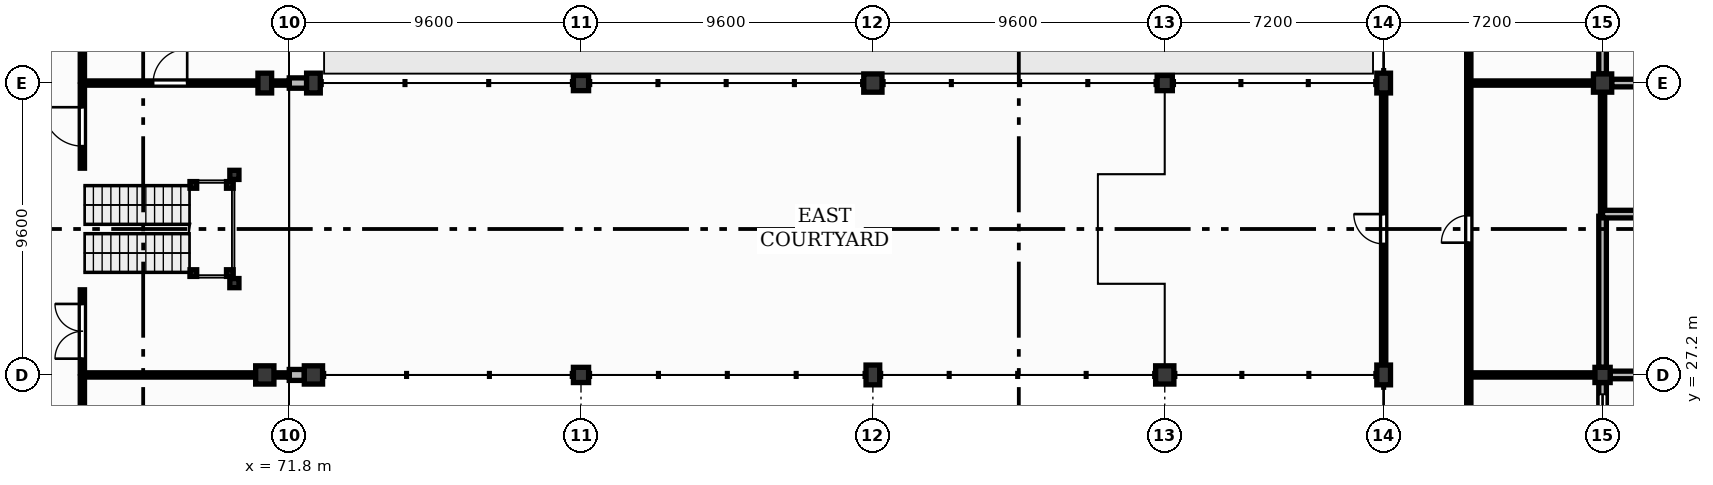
"""IFC4 building model, lengths in metres.
Left out: names, types, materials, properties, quantities, classifications, styles, units other than length and angle.
Written with IfcOpenShell. Run it as: python <this file> out.ifc"""

import sys

from ifc_helpers import new_model, si_unit, direction, frame, frame_2d, origin, origin_2d, place, context, subcontext, project, spatial, rectangle, hollow_circle, i_section, extrude, element, fill, save


model = new_model("IFC4")
c1 = context("Model", 3, precision=1e-05, world=origin(), true_north=direction((0.0, 1.0)))
c2 = subcontext(c1, "Body", "Model", "MODEL_VIEW")
j1 = project(units=[si_unit("LENGTHUNIT", "METRE"), si_unit("PLANEANGLEUNIT", "RADIAN")], contexts=[c1])
p1 = place(None, origin())
s1 = spatial("IfcSite", under=j1, at=p1, CompositionType="ELEMENT")
p2 = place(p1, origin())
s2 = spatial("IfcBuilding", under=s1, at=p2, CompositionType="ELEMENT")
p3 = place(p2, origin())
s3 = spatial("IfcBuildingStorey", under=s2, at=p3, CompositionType="ELEMENT", Elevation=0.0)
p4 = place(p3, frame((72.6, 27.2, 0.0), z_axis=(0.0, 0.0, 1.0), x_axis=(1.0, 0.0, 0.0)))
e1 = element("IfcColumn", 1, at=p4, inside=s3, PredefinedType="COLUMN", context=c2, shape_type="SweptSolid", body=[
    extrude(rectangle(XDim=0.6, YDim=0.6, at=origin_2d()), origin(), (0.0, 0.0, 1.0), 4.2),
])
p5 = place(p3, frame((72.6, 36.8, 0.0), z_axis=(0.0, 0.0, 1.0), x_axis=(1.0, 0.0, 0.0)))
e2 = element("IfcColumn", 2, at=p5, inside=s3, PredefinedType="COLUMN", context=c2, shape_type="SweptSolid", body=[
    extrude(rectangle(XDim=0.45, YDim=0.65, at=origin_2d()), origin(), (0.0, 0.0, 1.0), 4.2),
])
for number, where, z_axis, x_axis in (
    (3, (81.4, 27.2, 0.0), (0.0, 0.0, 1.0), (1.0, 0.0, 0.0)),
    (4, (81.4, 36.8, 0.0), (0.0, 0.0, 1.0), (1.0, 0.0, 0.0)),
):
    element("IfcColumn", number, at=place(p3, frame(where, z_axis=z_axis, x_axis=x_axis)), inside=s3, PredefinedType="COLUMN", context=c2, shape_type="SweptSolid", body=[
        extrude(rectangle(XDim=0.5, YDim=0.5, at=origin_2d()), origin(), (0.0, 0.0, 1.0), 4.2),
    ])
p6 = place(p3, frame((91.0, 27.2, 0.0), z_axis=(0.0, 0.0, 1.0), x_axis=(1.0, 0.0, 0.0)))
e5 = element("IfcColumn", 5, at=p6, inside=s3, PredefinedType="COLUMN", context=c2, shape_type="SweptSolid", body=[
    extrude(rectangle(XDim=0.45, YDim=0.65, at=origin_2d()), origin(), (0.0, 0.0, 1.0), 4.2),
])
for number, where, z_axis, x_axis in (
    (6, (91.0, 36.8, 0.0), (0.0, 0.0, 1.0), (1.0, 0.0, 0.0)),
    (7, (100.6, 27.2, 0.0), (0.0, 0.0, 1.0), (1.0, 0.0, 0.0)),
):
    element("IfcColumn", number, at=place(p3, frame(where, z_axis=z_axis, x_axis=x_axis)), inside=s3, PredefinedType="COLUMN", context=c2, shape_type="SweptSolid", body=[
        extrude(rectangle(XDim=0.6, YDim=0.6, at=origin_2d()), origin(), (0.0, 0.0, 1.0), 4.2),
    ])
p7 = place(p3, frame((100.6, 36.8, 0.0), z_axis=(0.0, 0.0, 1.0), x_axis=(1.0, 0.0, 0.0)))
e8 = element("IfcColumn", 8, at=p7, inside=s3, PredefinedType="COLUMN", context=c2, shape_type="SweptSolid", body=[
    extrude(rectangle(XDim=0.5, YDim=0.5, at=origin_2d()), origin(), (0.0, 0.0, 1.0), 4.2),
])
for number, where, z_axis, x_axis in (
    (9, (107.8, 27.2, 0.0), (0.0, 0.0, 1.0), (1.0, 0.0, 0.0)),
    (10, (107.8, 36.8, 0.0), (0.0, 0.0, 1.0), (1.0, 0.0, 0.0)),
):
    element("IfcColumn", number, at=place(p3, frame(where, z_axis=z_axis, x_axis=x_axis)), inside=s3, PredefinedType="COLUMN", context=c2, shape_type="SweptSolid", body=[
        extrude(rectangle(XDim=0.45, YDim=0.65, at=origin_2d()), origin(), (0.0, 0.0, 1.0), 4.2),
    ])
p8 = place(p3, frame((115.0, 27.2, 0.0), z_axis=(0.0, 0.0, 1.0), x_axis=(1.0, 0.0, 0.0)))
e11 = element("IfcColumn", 11, at=p8, inside=s3, PredefinedType="COLUMN", context=c2, shape_type="SweptSolid", body=[
    extrude(rectangle(XDim=0.5, YDim=0.5, at=origin_2d()), origin(), (0.0, 0.0, 1.0), 4.2),
])
for number, where, z_axis, x_axis in (
    (12, (115.0, 36.8, 0.0), (0.0, 0.0, 1.0), (1.0, 0.0, 0.0)),
    (13, (71.0, 27.2, 0.0), (0.0, 0.0, 1.0), (1.0, 0.0, 0.0)),
):
    element("IfcColumn", number, at=place(p3, frame(where, z_axis=z_axis, x_axis=x_axis)), inside=s3, PredefinedType="COLUMN", context=c2, shape_type="SweptSolid", body=[
        extrude(rectangle(XDim=0.6, YDim=0.6, at=origin_2d()), origin(), (0.0, 0.0, 1.0), 4.2),
    ])
p9 = place(p3, frame((71.0, 36.8, 0.0), z_axis=(0.0, 0.0, 1.0), x_axis=(1.0, 0.0, 0.0)))
e14 = element("IfcColumn", 14, at=p9, inside=s3, PredefinedType="COLUMN", context=c2, shape_type="SweptSolid", body=[
    extrude(rectangle(XDim=0.45, YDim=0.65, at=origin_2d()), origin(), (0.0, 0.0, 1.0), 4.2),
])
p10 = place(p3, frame((71.805, 27.2, 0.0), z_axis=(0.0, 0.0, 1.0), x_axis=(1.0, 0.0, 0.0)))
e15 = element("IfcWall", 15, at=p10, inside=s3, PredefinedType="SOLIDWALL", context=c2, shape_type="SweptSolid", body=[
    extrude(rectangle(XDim=0.495, YDim=0.36, at=frame_2d((0.248, 0.0))), origin(), (0.0, 0.0, 1.0), 4.2),
])
p11 = place(p3, frame((71.805, 36.8, 0.0), z_axis=(0.0, 0.0, 1.0), x_axis=(1.0, 0.0, 0.0)))
e16 = element("IfcWall", 16, at=p11, inside=s3, PredefinedType="SOLIDWALL", context=c2, shape_type="SweptSolid", body=[
    extrude(rectangle(XDim=0.57, YDim=0.34, at=frame_2d((0.285, 0.0))), origin(), (0.0, 0.0, 1.0), 4.2),
])
for number, where, z_axis, x_axis in (
    (17, (70.0, 30.22, 0.0), (0.0, 0.0, 1.0), (1.0, 0.0, 0.0)),
    (18, (70.0, 33.78, 0.0), (0.0, 0.0, 1.0), (1.0, 0.0, 0.0)),
):
    element("IfcColumn", number, at=place(p3, frame(where, z_axis=z_axis, x_axis=x_axis)), inside=s3, PredefinedType="COLUMN", context=c2, shape_type="SweptSolid", body=[
        extrude(i_section(OverallWidth=0.3, OverallDepth=0.3, WebThickness=0.011, FlangeThickness=0.019, FilletRadius=0.027, at=origin_2d()), origin(), (0.0, 0.0, 1.0), 4.2),
    ])
for number, where, z_axis, x_axis in (
    (19, (68.65, 30.55, 0.0), (0.0, 0.0, 1.0), (1.0, 0.0, 0.0)),
    (20, (69.85, 30.55, 0.0), (0.0, 0.0, 1.0), (1.0, 0.0, 0.0)),
    (21, (69.85, 33.45, 0.0), (0.0, 0.0, 1.0), (1.0, 0.0, 0.0)),
    (22, (68.65, 33.45, 0.0), (0.0, 0.0, 1.0), (1.0, 0.0, 0.0)),
):
    element("IfcColumn", number, at=place(p3, frame(where, z_axis=z_axis, x_axis=x_axis)), inside=s3, PredefinedType="COLUMN", context=c2, shape_type="SweptSolid", body=[
        extrude(hollow_circle(Radius=0.11, WallThickness=0.01, at=origin_2d()), origin(), (0.0, 0.0, 1.0), 2.03),
    ])
p12 = place(p3, frame((65.0, 18.67, 0.0), z_axis=(0.0, 0.0, 1.0), x_axis=(0.0, 1.0, 0.0)))
e23 = element("IfcWall", 23, at=p12, inside=s3, PredefinedType="PARTITIONING", context=c2, shape_type="SweptSolid", body=[
    extrude(rectangle(XDim=8.46, YDim=0.14, at=frame_2d((4.23, 0.0))), origin(), (0.0, 0.0, 1.0), 4.18),
])
p13 = place(p12, frame((3.33, 0.0, 0.0)))
e24 = element("IfcOpeningElement", 24, at=p13, cuts=e23, PredefinedType="OPENING", context=c2, shape_type="SweptSolid", body=[
    extrude(rectangle(XDim=1.8, YDim=2.3, at=frame_2d((0.9, 1.15))), frame((0.0, 0.08, 0.0), z_axis=(0.0, -1.0, 0.0), x_axis=(1.0, 0.0, 0.0)), (0.0, 0.0, 1.0), 0.16),
])
p14 = place(p3, frame((65.0, 27.27, 0.0), z_axis=(0.0, 0.0, 1.0), x_axis=(0.0, 1.0, 0.0)))
e25 = element("IfcWall", 25, at=p14, inside=s3, PredefinedType="PARTITIONING", context=c2, shape_type="SweptSolid", body=[
    extrude(rectangle(XDim=2.73, YDim=0.14, at=frame_2d((1.365, 0.0))), origin(), (0.0, 0.0, 1.0), 4.18),
])
p15 = place(p14, frame((0.465, 0.0, 0.0)))
e26 = element("IfcOpeningElement", 26, at=p15, cuts=e25, PredefinedType="OPENING", context=c2, shape_type="SweptSolid", body=[
    extrude(rectangle(XDim=1.8, YDim=2.3, at=frame_2d((0.9, 1.15))), frame((0.0, 0.08, 0.0), z_axis=(0.0, -1.0, 0.0), x_axis=(1.0, 0.0, 0.0)), (0.0, 0.0, 1.0), 0.16),
])
p16 = place(p3, frame((65.0, 27.2, 0.0), z_axis=(0.0, 0.0, 1.0), x_axis=(1.0, 0.0, 0.0)))
e27 = element("IfcWall", 27, at=p16, inside=s3, PredefinedType="PARTITIONING", context=c2, shape_type="SweptSolid", body=[
    extrude(rectangle(XDim=5.7, YDim=0.14, at=frame_2d((2.85, 0.0))), origin(), (0.0, 0.0, 1.0), 3.4),
])
p17 = place(p3, frame((71.3, 27.2, 0.0), z_axis=(0.0, 0.0, 1.0), x_axis=(1.0, 0.0, 0.0)))
e28 = element("IfcWall", 28, at=p17, inside=s3, PredefinedType="PARTITIONING", context=c2, shape_type="SweptSolid", body=[
    extrude(rectangle(XDim=0.495, YDim=0.14, at=frame_2d((0.248, 0.0))), origin(), (0.0, 0.0, 1.0), 4.18),
])
p18 = place(p3, frame((65.0, 34.0, 0.0), z_axis=(0.0, 0.0, 1.0), x_axis=(0.0, 1.0, 0.0)))
e29 = element("IfcWall", 29, at=p18, inside=s3, PredefinedType="PARTITIONING", context=c2, shape_type="SweptSolid", body=[
    extrude(rectangle(XDim=2.73, YDim=0.14, at=frame_2d((1.365, 0.0))), origin(), (0.0, 0.0, 1.0), 4.18),
])
p19 = place(p18, frame((0.725, 0.0, 0.0)))
e30 = element("IfcOpeningElement", 30, at=p19, cuts=e29, PredefinedType="OPENING", context=c2, shape_type="SweptSolid", body=[
    extrude(rectangle(XDim=1.28, YDim=2.2, at=frame_2d((0.64, 1.1))), frame((0.0, 0.08, 0.0), z_axis=(0.0, -1.0, 0.0), x_axis=(1.0, 0.0, 0.0)), (0.0, 0.0, 1.0), 0.16),
])
p20 = place(p3, frame((65.0, 36.87, 0.0), z_axis=(0.0, 0.0, 1.0), x_axis=(0.0, 1.0, 0.0)))
e31 = element("IfcWall", 31, at=p20, inside=s3, PredefinedType="PARTITIONING", context=c2, shape_type="SweptSolid", body=[
    extrude(rectangle(XDim=8.46, YDim=0.14, at=frame_2d((4.23, 0.0))), origin(), (0.0, 0.0, 1.0), 4.18),
])
p21 = place(p20, frame((3.755, 0.0, 0.0)))
e32 = element("IfcOpeningElement", 32, at=p21, cuts=e31, PredefinedType="OPENING", context=c2, shape_type="SweptSolid", body=[
    extrude(rectangle(XDim=0.95, YDim=2.1, at=frame_2d((0.475, 1.05))), frame((0.0, 0.08, 0.0), z_axis=(0.0, -1.0, 0.0), x_axis=(1.0, 0.0, 0.0)), (0.0, 0.0, 1.0), 0.16),
])
p22 = place(p3, frame((65.0, 36.8, 0.0), z_axis=(0.0, 0.0, 1.0), x_axis=(1.0, 0.0, 0.0)))
e33 = element("IfcWall", 33, at=p22, inside=s3, PredefinedType="PARTITIONING", context=c2, shape_type="SweptSolid", body=[
    extrude(rectangle(XDim=5.775, YDim=0.14, at=frame_2d((2.887, 0.0))), origin(), (0.0, 0.0, 1.0), 3.4),
])
p23 = place(p22, frame((2.327, 0.0, 0.0)))
e34 = element("IfcOpeningElement", 34, at=p23, cuts=e33, PredefinedType="OPENING", context=c2, shape_type="SweptSolid", body=[
    extrude(rectangle(XDim=1.12, YDim=2.15, at=frame_2d((0.56, 1.075))), frame((0.0, 0.08, 0.0), z_axis=(0.0, -1.0, 0.0), x_axis=(1.0, 0.0, 0.0)), (0.0, 0.0, 1.0), 0.16),
])
p24 = place(p3, frame((71.225, 36.8, 0.0), z_axis=(0.0, 0.0, 1.0), x_axis=(1.0, 0.0, 0.0)))
e35 = element("IfcWall", 35, at=p24, inside=s3, PredefinedType="PARTITIONING", context=c2, shape_type="SweptSolid", body=[
    extrude(rectangle(XDim=0.57, YDim=0.14, at=frame_2d((0.285, 0.0))), origin(), (0.0, 0.0, 1.0), 4.18),
])
p25 = place(p3, frame((107.8, 27.525, 0.0), z_axis=(0.0, 0.0, 1.0), x_axis=(0.0, 1.0, 0.0)))
e36 = element("IfcWall", 36, at=p25, inside=s3, PredefinedType="PARTITIONING", context=c2, shape_type="SweptSolid", body=[
    extrude(rectangle(XDim=8.95, YDim=0.14, at=frame_2d((4.475, 0.0))), origin(), (0.0, 0.0, 1.0), 3.4),
])
p26 = place(p25, frame((3.985, 0.0, 0.0)))
e37 = element("IfcOpeningElement", 37, at=p26, cuts=e36, PredefinedType="OPENING", context=c2, shape_type="SweptSolid", body=[
    extrude(rectangle(XDim=0.98, YDim=2.15, at=frame_2d((0.49, 1.075))), frame((0.0, 0.08, 0.0), z_axis=(0.0, -1.0, 0.0), x_axis=(1.0, 0.0, 0.0)), (0.0, 0.0, 1.0), 0.16),
])
p27 = place(p3, frame((110.6, 18.67, 0.0), z_axis=(0.0, 0.0, 1.0), x_axis=(0.0, 1.0, 0.0)))
e38 = element("IfcWall", 38, at=p27, inside=s3, PredefinedType="PARTITIONING", context=c2, shape_type="SweptSolid", body=[
    extrude(rectangle(XDim=8.46, YDim=0.14, at=frame_2d((4.23, 0.0))), origin(), (0.0, 0.0, 1.0), 4.18),
])
p28 = place(p27, frame((3.67, 0.0, 0.0)))
e39 = element("IfcOpeningElement", 39, at=p28, cuts=e38, PredefinedType="OPENING", context=c2, shape_type="SweptSolid", body=[
    extrude(rectangle(XDim=1.12, YDim=2.15, at=frame_2d((0.56, 1.075))), frame((0.0, 0.08, 0.0), z_axis=(0.0, -1.0, 0.0), x_axis=(1.0, 0.0, 0.0)), (0.0, 0.0, 1.0), 0.16),
])
p29 = place(p3, frame((110.6, 27.27, 0.0), z_axis=(0.0, 0.0, 1.0), x_axis=(0.0, 1.0, 0.0)))
e40 = element("IfcWall", 40, at=p29, inside=s3, PredefinedType="PARTITIONING", context=c2, shape_type="SweptSolid", body=[
    extrude(rectangle(XDim=9.46, YDim=0.14, at=frame_2d((4.73, 0.0))), origin(), (0.0, 0.0, 1.0), 4.18),
])
p30 = place(p29, frame((4.28, 0.0, 0.0)))
e41 = element("IfcOpeningElement", 41, at=p30, cuts=e40, PredefinedType="OPENING", context=c2, shape_type="SweptSolid", body=[
    extrude(rectangle(XDim=0.9, YDim=2.1, at=frame_2d((0.45, 1.05))), frame((0.0, 0.08, 0.0), z_axis=(0.0, -1.0, 0.0), x_axis=(1.0, 0.0, 0.0)), (0.0, 0.0, 1.0), 0.16),
])
p31 = place(p3, frame((110.6, 27.2, 0.0), z_axis=(0.0, 0.0, 1.0), x_axis=(1.0, 0.0, 0.0)))
e42 = element("IfcWall", 42, at=p31, inside=s3, PredefinedType="PARTITIONING", context=c2, shape_type="SweptSolid", body=[
    extrude(rectangle(XDim=4.15, YDim=0.14, at=frame_2d((2.075, 0.0))), origin(), (0.0, 0.0, 1.0), 3.6),
])
p32 = place(p3, frame((110.6, 36.87, 0.0), z_axis=(0.0, 0.0, 1.0), x_axis=(0.0, 1.0, 0.0)))
e43 = element("IfcWall", 43, at=p32, inside=s3, PredefinedType="PARTITIONING", context=c2, shape_type="SweptSolid", body=[
    extrude(rectangle(XDim=8.53, YDim=0.14, at=frame_2d((4.265, 0.0))), origin(), (0.0, 0.0, 1.0), 4.18),
])
p33 = place(p32, frame((3.655, 0.0, 0.0)))
e44 = element("IfcOpeningElement", 44, at=p33, cuts=e43, PredefinedType="OPENING", context=c2, shape_type="SweptSolid", body=[
    extrude(rectangle(XDim=1.22, YDim=2.1, at=frame_2d((0.61, 1.05))), frame((0.0, 0.08, 0.0), z_axis=(0.0, -1.0, 0.0), x_axis=(1.0, 0.0, 0.0)), (0.0, 0.0, 1.0), 0.16),
])
p34 = place(p3, frame((110.6, 36.8, 0.0), z_axis=(0.0, 0.0, 1.0), x_axis=(1.0, 0.0, 0.0)))
e45 = element("IfcWall", 45, at=p34, inside=s3, PredefinedType="PARTITIONING", context=c2, shape_type="SweptSolid", body=[
    extrude(rectangle(XDim=4.1, YDim=0.14, at=frame_2d((2.05, 0.0))), origin(), (0.0, 0.0, 1.0), 3.5),
])
p35 = place(p3, frame((115.0, 21.499, 0.0), z_axis=(0.0, 0.0, 1.0), x_axis=(0.0, 1.0, 0.0)))
e46 = element("IfcWall", 46, at=p35, inside=s3, PredefinedType="SOLIDWALL", context=c2, shape_type="SweptSolid", body=[
    extrude(rectangle(XDim=5.451, YDim=0.25, at=frame_2d((2.726, 0.0))), origin(), (0.0, 0.0, 1.0), 3.4),
])
p36 = place(p35, frame((2.186, 0.0, 0.0)))
e47 = element("IfcOpeningElement", 47, at=p36, cuts=e46, PredefinedType="OPENING", context=c2, shape_type="SweptSolid", body=[
    extrude(rectangle(XDim=1.08, YDim=2.15, at=frame_2d((0.54, 1.075))), frame((0.0, 0.135, 0.0), z_axis=(0.0, -1.0, 0.0), x_axis=(1.0, 0.0, 0.0)), (0.0, 0.0, 1.0), 0.27),
])
p37 = place(p35, frame((3.666, 0.0, 1.05)))
e48 = element("IfcOpeningElement", 48, at=p37, cuts=e46, PredefinedType="OPENING", context=c2, shape_type="SweptSolid", body=[
    extrude(rectangle(XDim=1.4, YDim=1.1, at=frame_2d((0.7, 0.55))), frame((0.0, 0.135, 0.0), z_axis=(0.0, -1.0, 0.0), x_axis=(1.0, 0.0, 0.0)), (0.0, 0.0, 1.0), 0.27),
])
p38 = place(p3, frame((115.0, 27.45, 0.0), z_axis=(0.0, 0.0, 1.0), x_axis=(0.0, 1.0, 0.0)))
e49 = element("IfcWall", 49, at=p38, inside=s3, PredefinedType="SOLIDWALL", context=c2, shape_type="SweptSolid", body=[
    extrude(rectangle(XDim=4.97, YDim=0.25, at=frame_2d((2.485, 0.0))), origin(), (0.0, 0.0, 1.0), 3.4),
])
p39 = place(p3, frame((115.25, 27.2, 0.0), z_axis=(0.0, 0.0, 1.0), x_axis=(1.0, 0.0, 0.0)))
e50 = element("IfcWall", 50, at=p39, inside=s3, PredefinedType="SOLIDWALL", context=c2, shape_type="SweptSolid", body=[
    extrude(rectangle(XDim=6.55, YDim=0.25, at=frame_2d((3.275, 0.0))), origin(), (0.0, 0.0, 1.0), 3.6),
])
p40 = place(p3, frame((115.0, 32.56, 0.0), z_axis=(0.0, 0.0, 1.0), x_axis=(0.0, 1.0, 0.0)))
e51 = element("IfcWall", 51, at=p40, inside=s3, PredefinedType="PARTITIONING", context=c2, shape_type="SweptSolid", body=[
    extrude(rectangle(XDim=3.94, YDim=0.14, at=frame_2d((1.97, 0.0))), origin(), (0.0, 0.0, 1.0), 3.4),
])
p41 = place(p3, frame((115.0, 32.49, 0.0), z_axis=(0.0, 0.0, 1.0), x_axis=(1.0, 0.0, 0.0)))
e52 = element("IfcWall", 52, at=p41, inside=s3, PredefinedType="SOLIDWALL", context=c2, shape_type="SweptSolid", body=[
    extrude(rectangle(XDim=6.8, YDim=0.25, at=frame_2d((3.4, 0.0))), origin(), (0.0, 0.0, 1.0), 4.18),
])
p42 = place(p3, frame((115.0, 37.1, 0.0), z_axis=(0.0, 0.0, 1.0), x_axis=(0.0, 1.0, 0.0)))
e53 = element("IfcWall", 53, at=p42, inside=s3, PredefinedType="SOLIDWALL", context=c2, shape_type="SweptSolid", body=[
    extrude(rectangle(XDim=3.423, YDim=0.25, at=frame_2d((1.711, 0.0))), origin(), (0.0, 0.0, 1.0), 3.4),
])
p43 = place(p3, frame((115.3, 36.8, 0.0), z_axis=(0.0, 0.0, 1.0), x_axis=(1.0, 0.0, 0.0)))
e54 = element("IfcWall", 54, at=p43, inside=s3, PredefinedType="SOLIDWALL", context=c2, shape_type="SweptSolid", body=[
    extrude(rectangle(XDim=6.5, YDim=0.25, at=frame_2d((3.25, 0.0))), origin(), (0.0, 0.0, 1.0), 3.5),
])
p44 = place(p15, origin())
e55 = element("IfcDoor", 55, at=p44, inside=s3, OperationType="DOUBLE_DOOR_SINGLE_SWING", PredefinedType="DOOR", context=c2, shape_type="SweptSolid", body=[
    extrude(rectangle(XDim=1.8, YDim=2.3, at=frame_2d((0.9, 1.15))), frame((0.0, 0.025, 0.0), z_axis=(0.0, -1.0, 0.0), x_axis=(1.0, 0.0, 0.0)), (0.0, 0.0, 1.0), 0.05),
])
fill(e26, e55)
p45 = place(p19, origin())
e56 = element("IfcDoor", 56, at=p45, inside=s3, OperationType="SINGLE_SWING_RIGHT", PredefinedType="DOOR", context=c2, shape_type="SweptSolid", body=[
    extrude(rectangle(XDim=1.28, YDim=2.2, at=frame_2d((0.64, 1.1))), frame((0.0, 0.025, 0.0), z_axis=(0.0, -1.0, 0.0), x_axis=(1.0, 0.0, 0.0)), (0.0, 0.0, 1.0), 0.05),
])
fill(e30, e56)
p46 = place(p26, origin())
e57 = element("IfcDoor", 57, at=p46, inside=s3, OperationType="SINGLE_SWING_RIGHT", PredefinedType="DOOR", context=c2, shape_type="SweptSolid", body=[
    extrude(rectangle(XDim=0.98, YDim=2.15, at=frame_2d((0.49, 1.075))), frame((0.0, 0.025, 0.0), z_axis=(0.0, -1.0, 0.0), x_axis=(1.0, 0.0, 0.0)), (0.0, 0.0, 1.0), 0.05),
])
fill(e37, e57)
p47 = place(p23, origin())
e58 = element("IfcDoor", 58, at=p47, inside=s3, OperationType="SINGLE_SWING_RIGHT", PredefinedType="DOOR", context=c2, shape_type="SweptSolid", body=[
    extrude(rectangle(XDim=1.12, YDim=2.15, at=frame_2d((0.56, 1.075))), frame((0.0, 0.025, 0.0), z_axis=(0.0, -1.0, 0.0), x_axis=(1.0, 0.0, 0.0)), (0.0, 0.0, 1.0), 0.05),
])
fill(e34, e58)
p48 = place(p30, origin())
e59 = element("IfcDoor", 59, at=p48, inside=s3, OperationType="SINGLE_SWING_LEFT", PredefinedType="DOOR", context=c2, shape_type="SweptSolid", body=[
    extrude(rectangle(XDim=0.9, YDim=2.1, at=frame_2d((0.45, 1.05))), frame((0.0, 0.025, 0.0), z_axis=(0.0, -1.0, 0.0), x_axis=(1.0, 0.0, 0.0)), (0.0, 0.0, 1.0), 0.05),
])
fill(e41, e59)
p49 = place(p37, origin())
e60 = element("IfcWindow", 60, at=p49, inside=s3, PartitioningType="SINGLE_PANEL", PredefinedType="WINDOW", context=c2, shape_type="SweptSolid", body=[
    extrude(rectangle(XDim=1.4, YDim=1.1, at=frame_2d((0.7, 0.55))), frame((0.0, 0.03, 0.0), z_axis=(0.0, -1.0, 0.0), x_axis=(1.0, 0.0, 0.0)), (0.0, 0.0, 1.0), 0.06),
])
fill(e48, e60)
save(model, sys.argv[1])
